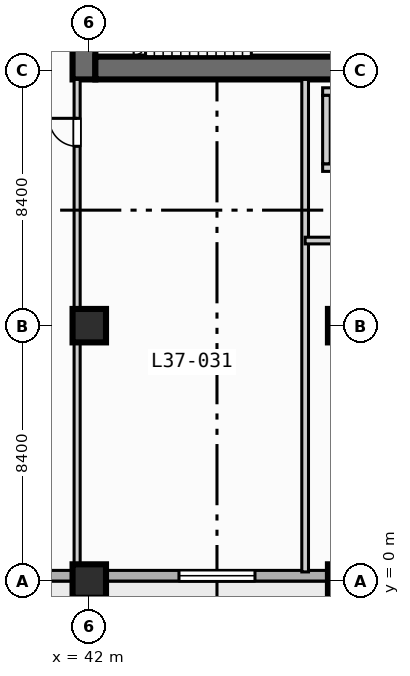
"""IFC4 building model, lengths in metres.
Left out: names, types, materials, properties, quantities, classifications, styles, units other than length and angle.
Written with IfcOpenShell. Run it as: python <this file> out.ifc"""

import sys

from ifc_helpers import new_model, si_unit, direction, frame, frame_2d, origin, origin_2d, place, context, subcontext, project, spatial, rectangle, extrude, element, fill, save


model = new_model("IFC4")
c1 = context("Model", 3, precision=1e-05, world=origin(), true_north=direction((0.0, 1.0)))
c2 = subcontext(c1, "Body", "Model", "MODEL_VIEW")
j1 = project(units=[si_unit("LENGTHUNIT", "METRE"), si_unit("PLANEANGLEUNIT", "RADIAN")], contexts=[c1])
p1 = place(None, origin())
s1 = spatial("IfcSite", under=j1, at=p1, CompositionType="ELEMENT")
p2 = place(p1, origin())
s2 = spatial("IfcBuilding", under=s1, at=p2, CompositionType="ELEMENT")
p3 = place(p2, frame((0.0, 0.0, 153.2)))
s3 = spatial("IfcBuildingStorey", under=s2, at=p3, CompositionType="ELEMENT", Elevation=153.2)
p4 = place(p3, frame((41.825, 16.5, 0.0), z_axis=(0.0, 0.0, 1.0), x_axis=(0.0, 1.0, 0.0)))
e1 = element("IfcWall", 1, at=p4, inside=s3, PredefinedType="SHEAR", context=c2, shape_type="SweptSolid", body=[
    extrude(rectangle(XDim=1.5, YDim=0.75, at=frame_2d((0.75, 0.0))), origin(), (0.0, 0.0, 1.0), 4.15),
])
p5 = place(p3, frame((42.2, 16.875, 0.0), z_axis=(0.0, 0.0, 1.0), x_axis=(1.0, 0.0, 0.0)))
e2 = element("IfcWall", 2, at=p5, inside=s3, PredefinedType="SHEAR", context=c2, shape_type="SweptSolid", body=[
    extrude(rectangle(XDim=16.35, YDim=0.75, at=frame_2d((8.175, 0.0))), origin(), (0.0, 0.0, 1.0), 4.15),
])
for number, where, z_axis, x_axis in (
    (3, (42.0, 0.0, 0.0), (0.0, 0.0, 1.0), (1.0, 0.0, 0.0)),
    (4, (42.0, 8.4, 0.0), (0.0, 0.0, 1.0), (1.0, 0.0, 0.0)),
    (5, (50.4, 0.0, 0.0), (0.0, 0.0, 1.0), (1.0, 0.0, 0.0)),
    (6, (50.4, 8.4, 0.0), (0.0, 0.0, 1.0), (1.0, 0.0, 0.0)),
):
    element("IfcColumn", number, at=place(p3, frame(where, z_axis=z_axis, x_axis=x_axis)), inside=s3, PredefinedType="COLUMN", context=c2, shape_type="SweptSolid", body=[
        extrude(rectangle(XDim=1.1, YDim=1.1, at=origin_2d()), origin(), (0.0, 0.0, 1.0), 4.4),
    ])
p6 = place(p3, frame((72.425, 0.175, 0.0), z_axis=(0.0, 0.0, 1.0), x_axis=(-1.0, 0.0, 0.0)))
e7 = element("IfcWall", 7, at=p6, inside=s3, PredefinedType="STANDARD", context=c2, shape_type="SweptSolid", body=[
    extrude(rectangle(XDim=69.25, YDim=0.35, at=frame_2d((34.625, 0.0))), origin(), (0.0, 0.0, 1.0), 4.15),
])
p7 = place(p6, frame((50.725, 0.0, 0.0)))
e8 = element("IfcOpeningElement", 8, at=p7, cuts=e7, PredefinedType="OPENING", context=c2, shape_type="SweptSolid", body=[
    extrude(rectangle(XDim=1.4, YDim=2.2, at=frame_2d((0.7, 1.1))), frame((0.0, 0.185, 0.0), z_axis=(0.0, -1.0, 0.0), x_axis=(1.0, 0.0, 0.0)), (0.0, 0.0, 1.0), 0.37),
])
p8 = place(p6, frame((24.975, 0.0, 0.85)))
e9 = element("IfcOpeningElement", 9, at=p8, cuts=e7, PredefinedType="OPENING", context=c2, shape_type="SweptSolid", body=[
    extrude(rectangle(XDim=2.5, YDim=2.2, at=frame_2d((1.25, 1.1))), frame((0.0, 0.185, 0.0), z_axis=(0.0, -1.0, 0.0), x_axis=(1.0, 0.0, 0.0)), (0.0, 0.0, 1.0), 0.37),
])
p9 = place(p6, frame((8.175, 0.0, 0.85)))
e10 = element("IfcOpeningElement", 10, at=p9, cuts=e7, PredefinedType="OPENING", context=c2, shape_type="SweptSolid", body=[
    extrude(rectangle(XDim=2.5, YDim=2.2, at=frame_2d((1.25, 1.1))), frame((0.0, 0.185, 0.0), z_axis=(0.0, -1.0, 0.0), x_axis=(1.0, 0.0, 0.0)), (0.0, 0.0, 1.0), 0.37),
])
p10 = place(p3, frame((49.675, 13.6, 0.0), z_axis=(0.0, 0.0, 1.0), x_axis=(1.0, 0.0, 0.0)))
e11 = element("IfcWall", 11, at=p10, inside=s3, PredefinedType="SOLIDWALL", context=c2, shape_type="SweptSolid", body=[
    extrude(rectangle(XDim=2.25, YDim=0.25, at=frame_2d((1.125, 0.0))), origin(), (0.0, 0.0, 1.0), 4.15),
])
p11 = place(p10, frame((0.4, 0.0, 0.0)))
e12 = element("IfcOpeningElement", 12, at=p11, cuts=e11, PredefinedType="OPENING", context=c2, shape_type="SweptSolid", body=[
    extrude(rectangle(XDim=1.1, YDim=2.15, at=frame_2d((0.55, 1.075))), frame((0.0, 0.135, 0.0), z_axis=(0.0, -1.0, 0.0), x_axis=(1.0, 0.0, 0.0)), (0.0, 0.0, 1.0), 0.27),
])
for number, where, z_axis, x_axis in (
    (13, (49.675, 16.1, 0.0), (0.0, 0.0, 1.0), (1.0, 0.0, 0.0)),
    (14, (49.8, 13.725, 0.0), (0.0, 0.0, 1.0), (0.0, 1.0, 0.0)),
):
    element("IfcWall", number, at=place(p3, frame(where, z_axis=z_axis, x_axis=x_axis)), inside=s3, PredefinedType="SOLIDWALL", context=c2, shape_type="SweptSolid", body=[
        extrude(rectangle(XDim=2.25, YDim=0.25, at=frame_2d((1.125, 0.0))), origin(), (0.0, 0.0, 1.0), 4.15),
    ])
p12 = place(p3, frame((41.6, 0.3, 0.0), z_axis=(0.0, 0.0, 1.0), x_axis=(0.0, 1.0, 0.0)))
e15 = element("IfcWall", 15, at=p12, inside=s3, PredefinedType="PARTITIONING", context=c2, shape_type="SweptSolid", body=[
    extrude(rectangle(XDim=16.2, YDim=0.2, at=frame_2d((8.1, 0.0))), origin(), (0.0, 0.0, 1.0), 4.15),
])
p13 = place(p12, frame((14.0, 0.0, 0.0)))
e16 = element("IfcOpeningElement", 16, at=p13, cuts=e15, PredefinedType="OPENING", context=c2, shape_type="SweptSolid", body=[
    extrude(rectangle(XDim=0.92, YDim=2.1, at=frame_2d((0.46, 1.05))), frame((0.0, 0.11, 0.0), z_axis=(0.0, -1.0, 0.0), x_axis=(1.0, 0.0, 0.0)), (0.0, 0.0, 1.0), 0.22),
])
p14 = place(p3, frame((49.1, 0.3, 0.0), z_axis=(0.0, 0.0, 1.0), x_axis=(0.0, 1.0, 0.0)))
e17 = element("IfcWall", 17, at=p14, inside=s3, PredefinedType="PARTITIONING", context=c2, shape_type="SweptSolid", body=[
    extrude(rectangle(XDim=16.2, YDim=0.22, at=frame_2d((8.1, 0.0))), origin(), (0.0, 0.0, 1.0), 4.15),
])
p15 = place(p3, frame((49.1, 11.2, 0.0), z_axis=(0.0, 0.0, 1.0), x_axis=(1.0, 0.0, 0.0)))
e18 = element("IfcWall", 18, at=p15, inside=s3, PredefinedType="PARTITIONING", context=c2, shape_type="SweptSolid", body=[
    extrude(rectangle(XDim=9.3, YDim=0.22, at=frame_2d((4.65, 0.0))), origin(), (0.0, 0.0, 1.0), 4.15),
])
p16 = place(p8, origin())
e19 = element("IfcWindow", 19, at=p16, inside=s3, PartitioningType="SINGLE_PANEL", PredefinedType="WINDOW", context=c2, shape_type="SweptSolid", body=[
    extrude(rectangle(XDim=2.5, YDim=2.2, at=frame_2d((1.25, 1.1))), frame((0.0, 0.03, 0.0), z_axis=(0.0, -1.0, 0.0), x_axis=(1.0, 0.0, 0.0)), (0.0, 0.0, 1.0), 0.06),
])
fill(e9, e19)
p17 = place(p13, origin())
e20 = element("IfcDoor", 20, at=p17, inside=s3, OperationType="SINGLE_SWING_RIGHT", PredefinedType="DOOR", context=c2, shape_type="SweptSolid", body=[
    extrude(rectangle(XDim=0.92, YDim=2.1, at=frame_2d((0.46, 1.05))), frame((0.0, 0.025, 0.0), z_axis=(0.0, -1.0, 0.0), x_axis=(1.0, 0.0, 0.0)), (0.0, 0.0, 1.0), 0.05),
])
fill(e16, e20)
save(model, sys.argv[1])
